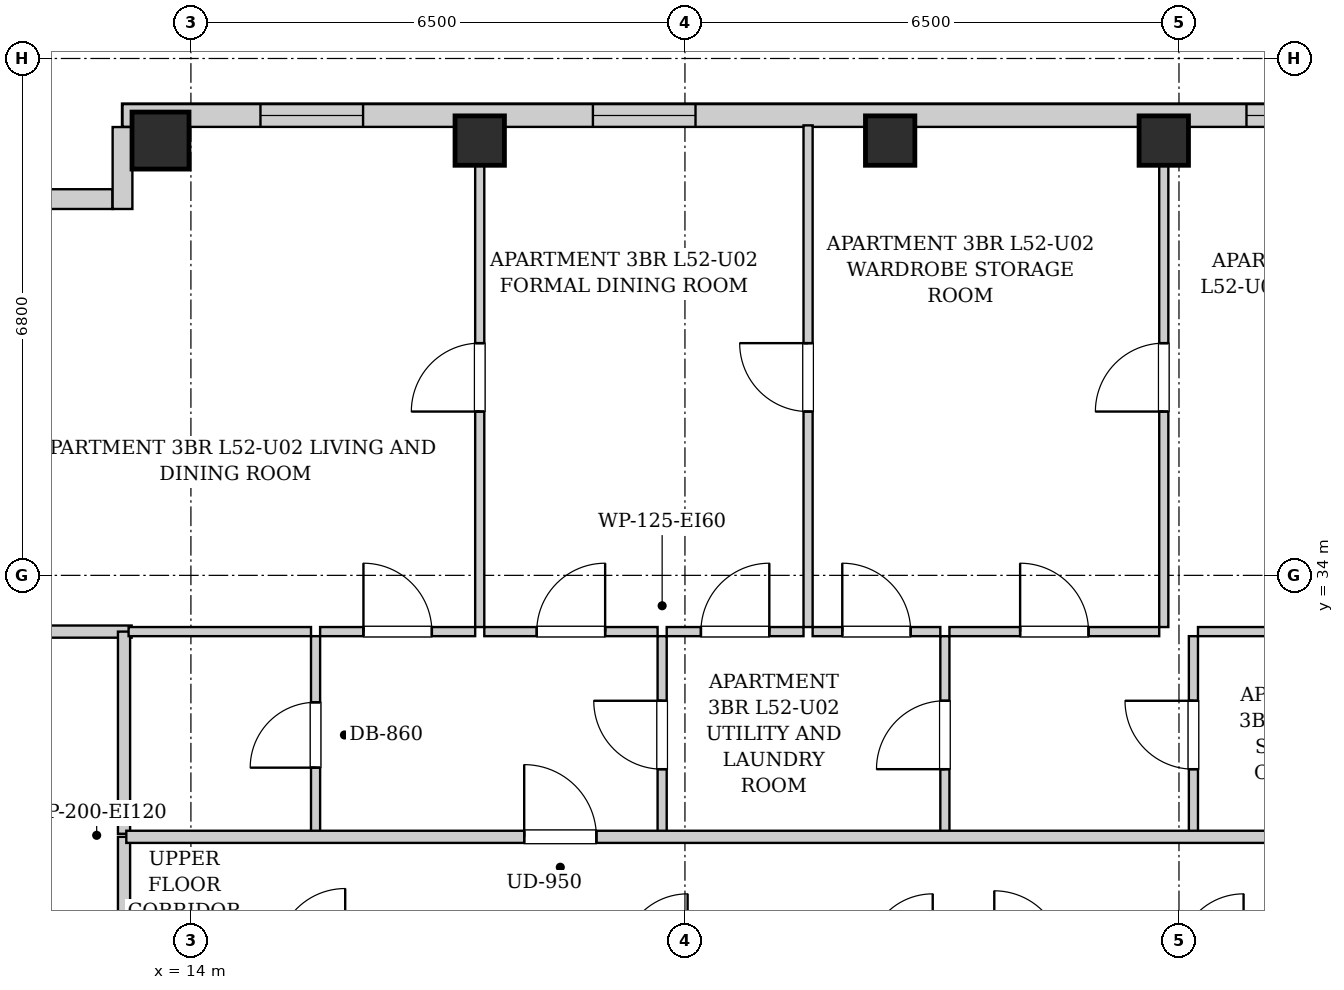
"""IFC4 building model, lengths in metres.
Left out: names, types, materials, properties, quantities, classifications, styles, units other than length and angle.
Written with IfcOpenShell. Run it as: python <this file> out.ifc"""

import sys

from ifc_helpers import new_model, si_unit, direction, frame, frame_2d, origin, origin_2d, place, context, subcontext, project, spatial, rectangle, extrude, element, fill, save


model = new_model("IFC4")
c1 = context("Model", 3, precision=1e-05, world=origin(), true_north=direction((0.0, 1.0)))
c2 = subcontext(c1, "Body", "Model", "MODEL_VIEW")
j1 = project(units=[si_unit("LENGTHUNIT", "METRE"), si_unit("PLANEANGLEUNIT", "RADIAN")], contexts=[c1])
p1 = place(None, origin())
s1 = spatial("IfcSite", under=j1, at=p1, CompositionType="ELEMENT")
p2 = place(p1, origin())
s2 = spatial("IfcBuilding", under=s1, at=p2, CompositionType="ELEMENT")
p3 = place(p2, frame((0.0, 0.0, 181.0)))
s3 = spatial("IfcBuildingStorey", under=s2, at=p3, CompositionType="ELEMENT", Elevation=181.0)
p4 = place(p3, frame((13.6, 39.72, 0.0), z_axis=(0.0, 0.0, 1.0), x_axis=(1.0, 0.0, 0.0)))
e1 = element("IfcColumn", 1, at=p4, inside=s3, PredefinedType="COLUMN", context=c2, shape_type="SweptSolid", body=[
    extrude(rectangle(XDim=0.75, YDim=0.75, at=origin_2d()), origin(), (0.0, 0.0, 1.0), 3.3),
])
for number, where, z_axis, x_axis in (
    (2, (17.8, 39.72, 0.0), (0.0, 0.0, 1.0), (1.0, 0.0, 0.0)),
    (3, (23.2, 39.72, 0.0), (0.0, 0.0, 1.0), (1.0, 0.0, 0.0)),
    (4, (26.8, 39.72, 0.0), (0.0, 0.0, 1.0), (1.0, 0.0, 0.0)),
):
    element("IfcColumn", number, at=place(p3, frame(where, z_axis=z_axis, x_axis=x_axis)), inside=s3, PredefinedType="COLUMN", context=c2, shape_type="SweptSolid", body=[
        extrude(rectangle(XDim=0.65, YDim=0.65, at=origin_2d()), origin(), (0.0, 0.0, 1.0), 3.3),
    ])
p5 = place(p3, frame((13.1, 40.05, 0.0), z_axis=(0.0, 0.0, 1.0), x_axis=(1.0, 0.0, 0.0)))
e5 = element("IfcWall", 5, at=p5, inside=s3, PredefinedType="SOLIDWALL", context=c2, shape_type="SweptSolid", body=[
    extrude(rectangle(XDim=17.5, YDim=0.3, at=frame_2d((8.75, 0.0))), origin(), (0.0, 0.0, 1.0), 3.04),
])
p6 = place(p5, frame((1.815, 0.0, 0.55)))
e6 = element("IfcOpeningElement", 6, at=p6, cuts=e5, PredefinedType="OPENING", context=c2, shape_type="SweptSolid", body=[
    extrude(rectangle(XDim=1.35, YDim=1.2, at=frame_2d((0.675, 0.6))), frame((0.0, 0.16, 0.0), z_axis=(0.0, -1.0, 0.0), x_axis=(1.0, 0.0, 0.0)), (0.0, 0.0, 1.0), 0.32),
])
p7 = place(p5, frame((6.189, 0.0, 0.55)))
e7 = element("IfcOpeningElement", 7, at=p7, cuts=e5, PredefinedType="OPENING", context=c2, shape_type="SweptSolid", body=[
    extrude(rectangle(XDim=1.35, YDim=1.2, at=frame_2d((0.675, 0.6))), frame((0.0, 0.16, 0.0), z_axis=(0.0, -1.0, 0.0), x_axis=(1.0, 0.0, 0.0)), (0.0, 0.0, 1.0), 0.32),
])
p8 = place(p5, frame((14.788, 0.0, 0.55)))
e8 = element("IfcOpeningElement", 8, at=p8, cuts=e5, PredefinedType="OPENING", context=c2, shape_type="SweptSolid", body=[
    extrude(rectangle(XDim=1.35, YDim=1.2, at=frame_2d((0.675, 0.6))), frame((0.0, 0.16, 0.0), z_axis=(0.0, -1.0, 0.0), x_axis=(1.0, 0.0, 0.0)), (0.0, 0.0, 1.0), 0.32),
])
p9 = place(p3, frame((11.982, 38.95, 0.0), z_axis=(0.0, 0.0, 1.0), x_axis=(1.0, 0.0, 0.0)))
e9 = element("IfcWall", 9, at=p9, inside=s3, PredefinedType="SOLIDWALL", context=c2, shape_type="SweptSolid", body=[
    extrude(rectangle(XDim=0.986, YDim=0.26, at=frame_2d((0.493, 0.0))), origin(), (0.0, 0.0, 1.0), 3.04),
])
p10 = place(p3, frame((13.1, 38.82, 0.0), z_axis=(0.0, 0.0, 1.0), x_axis=(0.0, 1.0, 0.0)))
e10 = element("IfcWall", 10, at=p10, inside=s3, PredefinedType="SOLIDWALL", context=c2, shape_type="SweptSolid", body=[
    extrude(rectangle(XDim=1.078, YDim=0.26, at=frame_2d((0.539, 0.0))), origin(), (0.0, 0.0, 1.0), 3.04),
])
p11 = place(p3, frame((13.12, 28.98, 0.0), z_axis=(0.0, 0.0, 1.0), x_axis=(0.0, 1.0, 0.0)))
e11 = element("IfcWall", 11, at=p11, inside=s3, PredefinedType="PARTITIONING", context=c2, shape_type="SweptSolid", body=[
    extrude(rectangle(XDim=1.58, YDim=0.16, at=frame_2d((0.79, 0.0))), origin(), (0.0, 0.0, 1.0), 3.04),
])
p12 = place(p3, frame((10.88, 33.26, 0.0), z_axis=(0.0, 0.0, 1.0), x_axis=(1.0, 0.0, 0.0)))
e12 = element("IfcWall", 12, at=p12, inside=s3, PredefinedType="PARTITIONING", context=c2, shape_type="SweptSolid", body=[
    extrude(rectangle(XDim=2.34, YDim=0.16, at=frame_2d((1.17, 0.0))), origin(), (0.0, 0.0, 1.0), 3.04),
])
p13 = place(p3, frame((13.12, 30.6, 0.0), z_axis=(0.0, 0.0, 1.0), x_axis=(0.0, 1.0, 0.0)))
e13 = element("IfcWall", 13, at=p13, inside=s3, PredefinedType="PARTITIONING", context=c2, shape_type="SweptSolid", body=[
    extrude(rectangle(XDim=2.66, YDim=0.16, at=frame_2d((1.33, 0.0))), origin(), (0.0, 0.0, 1.0), 3.04),
])
p14 = place(p3, frame((15.64, 30.6, 0.0), z_axis=(0.0, 0.0, 1.0), x_axis=(0.0, 1.0, 0.0)))
e14 = element("IfcWall", 14, at=p14, inside=s3, PredefinedType="PARTITIONING", context=c2, shape_type="SweptSolid", body=[
    extrude(rectangle(XDim=2.6, YDim=0.12, at=frame_2d((1.3, 0.0))), origin(), (0.0, 0.0, 1.0), 3.04),
])
p15 = place(p14, frame((0.87, 0.0, 0.0)))
e15 = element("IfcOpeningElement", 15, at=p15, cuts=e14, PredefinedType="OPENING", context=c2, shape_type="SweptSolid", body=[
    extrude(rectangle(XDim=0.86, YDim=2.05, at=frame_2d((0.43, 1.025))), frame((0.0, 0.07, 0.0), z_axis=(0.0, -1.0, 0.0), x_axis=(1.0, 0.0, 0.0)), (0.0, 0.0, 1.0), 0.14),
])
p16 = place(p3, frame((13.18, 33.26, 0.0), z_axis=(0.0, 0.0, 1.0), x_axis=(1.0, 0.0, 0.0)))
e16 = element("IfcWall", 16, at=p16, inside=s3, PredefinedType="PARTITIONING", context=c2, shape_type="SweptSolid", body=[
    extrude(rectangle(XDim=2.4, YDim=0.12, at=frame_2d((1.2, 0.0))), origin(), (0.0, 0.0, 1.0), 3.04),
])
p17 = place(p3, frame((20.2, 30.6, 0.0), z_axis=(0.0, 0.0, 1.0), x_axis=(0.0, 1.0, 0.0)))
e17 = element("IfcWall", 17, at=p17, inside=s3, PredefinedType="PARTITIONING", context=c2, shape_type="SweptSolid", body=[
    extrude(rectangle(XDim=2.6, YDim=0.12, at=frame_2d((1.3, 0.0))), origin(), (0.0, 0.0, 1.0), 3.04),
])
p18 = place(p17, frame((0.85, 0.0, 0.0)))
e18 = element("IfcOpeningElement", 18, at=p18, cuts=e17, PredefinedType="OPENING", context=c2, shape_type="SweptSolid", body=[
    extrude(rectangle(XDim=0.9, YDim=2.05, at=frame_2d((0.45, 1.025))), frame((0.0, 0.07, 0.0), z_axis=(0.0, -1.0, 0.0), x_axis=(1.0, 0.0, 0.0)), (0.0, 0.0, 1.0), 0.14),
])
p19 = place(p3, frame((15.7, 33.26, 0.0), z_axis=(0.0, 0.0, 1.0), x_axis=(1.0, 0.0, 0.0)))
e19 = element("IfcWall", 19, at=p19, inside=s3, PredefinedType="PARTITIONING", context=c2, shape_type="SweptSolid", body=[
    extrude(rectangle(XDim=2.04, YDim=0.12, at=frame_2d((1.02, 0.0))), origin(), (0.0, 0.0, 1.0), 3.04),
])
p20 = place(p19, frame((0.57, 0.0, 0.0)))
e20 = element("IfcOpeningElement", 20, at=p20, cuts=e19, PredefinedType="OPENING", context=c2, shape_type="SweptSolid", body=[
    extrude(rectangle(XDim=0.9, YDim=2.05, at=frame_2d((0.45, 1.025))), frame((0.0, 0.07, 0.0), z_axis=(0.0, -1.0, 0.0), x_axis=(1.0, 0.0, 0.0)), (0.0, 0.0, 1.0), 0.14),
])
p21 = place(p3, frame((17.86, 33.26, 0.0), z_axis=(0.0, 0.0, 1.0), x_axis=(1.0, 0.0, 0.0)))
e21 = element("IfcWall", 21, at=p21, inside=s3, PredefinedType="PARTITIONING", context=c2, shape_type="SweptSolid", body=[
    extrude(rectangle(XDim=2.28, YDim=0.12, at=frame_2d((1.14, 0.0))), origin(), (0.0, 0.0, 1.0), 3.04),
])
p22 = place(p21, frame((0.69, 0.0, 0.0)))
e22 = element("IfcOpeningElement", 22, at=p22, cuts=e21, PredefinedType="OPENING", context=c2, shape_type="SweptSolid", body=[
    extrude(rectangle(XDim=0.9, YDim=2.05, at=frame_2d((0.45, 1.025))), frame((0.0, 0.07, 0.0), z_axis=(0.0, -1.0, 0.0), x_axis=(1.0, 0.0, 0.0)), (0.0, 0.0, 1.0), 0.14),
])
p23 = place(p3, frame((23.92, 30.6, 0.0), z_axis=(0.0, 0.0, 1.0), x_axis=(0.0, 1.0, 0.0)))
e23 = element("IfcWall", 23, at=p23, inside=s3, PredefinedType="PARTITIONING", context=c2, shape_type="SweptSolid", body=[
    extrude(rectangle(XDim=2.6, YDim=0.12, at=frame_2d((1.3, 0.0))), origin(), (0.0, 0.0, 1.0), 3.04),
])
p24 = place(p23, frame((0.85, 0.0, 0.0)))
e24 = element("IfcOpeningElement", 24, at=p24, cuts=e23, PredefinedType="OPENING", context=c2, shape_type="SweptSolid", body=[
    extrude(rectangle(XDim=0.9, YDim=2.05, at=frame_2d((0.45, 1.025))), frame((0.0, 0.07, 0.0), z_axis=(0.0, -1.0, 0.0), x_axis=(1.0, 0.0, 0.0)), (0.0, 0.0, 1.0), 0.14),
])
p25 = place(p3, frame((20.26, 33.26, 0.0), z_axis=(0.0, 0.0, 1.0), x_axis=(1.0, 0.0, 0.0)))
e25 = element("IfcWall", 25, at=p25, inside=s3, PredefinedType="PARTITIONING", context=c2, shape_type="SweptSolid", body=[
    extrude(rectangle(XDim=1.8, YDim=0.12, at=frame_2d((0.9, 0.0))), origin(), (0.0, 0.0, 1.0), 3.04),
])
p26 = place(p25, frame((0.45, 0.0, 0.0)))
e26 = element("IfcOpeningElement", 26, at=p26, cuts=e25, PredefinedType="OPENING", context=c2, shape_type="SweptSolid", body=[
    extrude(rectangle(XDim=0.9, YDim=2.05, at=frame_2d((0.45, 1.025))), frame((0.0, 0.07, 0.0), z_axis=(0.0, -1.0, 0.0), x_axis=(1.0, 0.0, 0.0)), (0.0, 0.0, 1.0), 0.14),
])
p27 = place(p3, frame((22.18, 33.26, 0.0), z_axis=(0.0, 0.0, 1.0), x_axis=(1.0, 0.0, 0.0)))
e27 = element("IfcWall", 27, at=p27, inside=s3, PredefinedType="PARTITIONING", context=c2, shape_type="SweptSolid", body=[
    extrude(rectangle(XDim=1.68, YDim=0.12, at=frame_2d((0.84, 0.0))), origin(), (0.0, 0.0, 1.0), 3.04),
])
p28 = place(p27, frame((0.39, 0.0, 0.0)))
e28 = element("IfcOpeningElement", 28, at=p28, cuts=e27, PredefinedType="OPENING", context=c2, shape_type="SweptSolid", body=[
    extrude(rectangle(XDim=0.9, YDim=2.05, at=frame_2d((0.45, 1.025))), frame((0.0, 0.07, 0.0), z_axis=(0.0, -1.0, 0.0), x_axis=(1.0, 0.0, 0.0)), (0.0, 0.0, 1.0), 0.14),
])
p29 = place(p3, frame((27.19, 30.6, 0.0), z_axis=(0.0, 0.0, 1.0), x_axis=(0.0, 1.0, 0.0)))
e29 = element("IfcWall", 29, at=p29, inside=s3, PredefinedType="PARTITIONING", context=c2, shape_type="SweptSolid", body=[
    extrude(rectangle(XDim=2.6, YDim=0.12, at=frame_2d((1.3, 0.0))), origin(), (0.0, 0.0, 1.0), 3.04),
])
p30 = place(p29, frame((0.85, 0.0, 0.0)))
e30 = element("IfcOpeningElement", 30, at=p30, cuts=e29, PredefinedType="OPENING", context=c2, shape_type="SweptSolid", body=[
    extrude(rectangle(XDim=0.9, YDim=2.05, at=frame_2d((0.45, 1.025))), frame((0.0, 0.07, 0.0), z_axis=(0.0, -1.0, 0.0), x_axis=(1.0, 0.0, 0.0)), (0.0, 0.0, 1.0), 0.14),
])
p31 = place(p3, frame((23.98, 33.26, 0.0), z_axis=(0.0, 0.0, 1.0), x_axis=(1.0, 0.0, 0.0)))
e31 = element("IfcWall", 31, at=p31, inside=s3, PredefinedType="PARTITIONING", context=c2, shape_type="SweptSolid", body=[
    extrude(rectangle(XDim=2.76, YDim=0.12, at=frame_2d((1.38, 0.0))), origin(), (0.0, 0.0, 1.0), 3.04),
])
p32 = place(p31, frame((0.93, 0.0, 0.0)))
e32 = element("IfcOpeningElement", 32, at=p32, cuts=e31, PredefinedType="OPENING", context=c2, shape_type="SweptSolid", body=[
    extrude(rectangle(XDim=0.9, YDim=2.05, at=frame_2d((0.45, 1.025))), frame((0.0, 0.07, 0.0), z_axis=(0.0, -1.0, 0.0), x_axis=(1.0, 0.0, 0.0)), (0.0, 0.0, 1.0), 0.14),
])
p33 = place(p3, frame((27.25, 33.26, 0.0), z_axis=(0.0, 0.0, 1.0), x_axis=(1.0, 0.0, 0.0)))
e33 = element("IfcWall", 33, at=p33, inside=s3, PredefinedType="PARTITIONING", context=c2, shape_type="SweptSolid", body=[
    extrude(rectangle(XDim=3.09, YDim=0.12, at=frame_2d((1.545, 0.0))), origin(), (0.0, 0.0, 1.0), 3.04),
])
p34 = place(p33, frame((1.095, 0.0, 0.0)))
e34 = element("IfcOpeningElement", 34, at=p34, cuts=e33, PredefinedType="OPENING", context=c2, shape_type="SweptSolid", body=[
    extrude(rectangle(XDim=0.9, YDim=2.05, at=frame_2d((0.45, 1.025))), frame((0.0, 0.07, 0.0), z_axis=(0.0, -1.0, 0.0), x_axis=(1.0, 0.0, 0.0)), (0.0, 0.0, 1.0), 0.14),
])
p35 = place(p3, frame((17.8, 33.32, 0.0), z_axis=(0.0, 0.0, 1.0), x_axis=(0.0, 1.0, 0.0)))
e35 = element("IfcWall", 35, at=p35, inside=s3, PredefinedType="PARTITIONING", context=c2, shape_type="SweptSolid", body=[
    extrude(rectangle(XDim=6.6, YDim=0.12, at=frame_2d((3.3, 0.0))), origin(), (0.0, 0.0, 1.0), 2.556),
])
p36 = place(p35, frame((2.835, 0.0, 0.0)))
e36 = element("IfcOpeningElement", 36, at=p36, cuts=e35, PredefinedType="OPENING", context=c2, shape_type="SweptSolid", body=[
    extrude(rectangle(XDim=0.9, YDim=2.05, at=frame_2d((0.45, 1.025))), frame((0.0, 0.07, 0.0), z_axis=(0.0, -1.0, 0.0), x_axis=(1.0, 0.0, 0.0)), (0.0, 0.0, 1.0), 0.14),
])
p37 = place(p3, frame((22.12, 33.32, 0.0), z_axis=(0.0, 0.0, 1.0), x_axis=(0.0, 1.0, 0.0)))
e37 = element("IfcWall", 37, at=p37, inside=s3, PredefinedType="PARTITIONING", context=c2, shape_type="SweptSolid", body=[
    extrude(rectangle(XDim=6.6, YDim=0.12, at=frame_2d((3.3, 0.0))), origin(), (0.0, 0.0, 1.0), 3.04),
])
p38 = place(p37, frame((2.835, 0.0, 0.0)))
e38 = element("IfcOpeningElement", 38, at=p38, cuts=e37, PredefinedType="OPENING", context=c2, shape_type="SweptSolid", body=[
    extrude(rectangle(XDim=0.9, YDim=2.05, at=frame_2d((0.45, 1.025))), frame((0.0, 0.07, 0.0), z_axis=(0.0, -1.0, 0.0), x_axis=(1.0, 0.0, 0.0)), (0.0, 0.0, 1.0), 0.14),
])
p39 = place(p3, frame((26.8, 33.32, 0.0), z_axis=(0.0, 0.0, 1.0), x_axis=(0.0, 1.0, 0.0)))
e39 = element("IfcWall", 39, at=p39, inside=s3, PredefinedType="PARTITIONING", context=c2, shape_type="SweptSolid", body=[
    extrude(rectangle(XDim=6.6, YDim=0.12, at=frame_2d((3.3, 0.0))), origin(), (0.0, 0.0, 1.0), 3.04),
])
p40 = place(p39, frame((2.835, 0.0, 0.0)))
e40 = element("IfcOpeningElement", 40, at=p40, cuts=e39, PredefinedType="OPENING", context=c2, shape_type="SweptSolid", body=[
    extrude(rectangle(XDim=0.9, YDim=2.05, at=frame_2d((0.45, 1.025))), frame((0.0, 0.07, 0.0), z_axis=(0.0, -1.0, 0.0), x_axis=(1.0, 0.0, 0.0)), (0.0, 0.0, 1.0), 0.14),
])
p41 = place(p3, frame((13.15, 30.56, 0.0), z_axis=(0.0, 0.0, 1.0), x_axis=(1.0, 0.0, 0.0)))
e41 = element("IfcWall", 41, at=p41, inside=s3, PredefinedType="PARTITIONING", context=c2, shape_type="SweptSolid", body=[
    extrude(rectangle(XDim=24.6, YDim=0.16, at=frame_2d((12.3, 0.0))), origin(), (0.0, 0.0, 1.0), 3.04),
])
p42 = place(p41, frame((5.235, 0.0, 0.0)))
e42 = element("IfcOpeningElement", 42, at=p42, cuts=e41, PredefinedType="OPENING", context=c2, shape_type="SweptSolid", body=[
    extrude(rectangle(XDim=0.95, YDim=2.1, at=frame_2d((0.475, 1.05))), frame((0.0, 0.09, 0.0), z_axis=(0.0, -1.0, 0.0), x_axis=(1.0, 0.0, 0.0)), (0.0, 0.0, 1.0), 0.18),
])
p43 = place(p15, origin())
e43 = element("IfcDoor", 43, at=p43, inside=s3, OperationType="SINGLE_SWING_LEFT", PredefinedType="DOOR", context=c2, shape_type="SweptSolid", body=[
    extrude(rectangle(XDim=0.86, YDim=2.05, at=frame_2d((0.43, 1.025))), frame((0.0, 0.025, 0.0), z_axis=(0.0, -1.0, 0.0), x_axis=(1.0, 0.0, 0.0)), (0.0, 0.0, 1.0), 0.05),
])
fill(e15, e43)
p44 = place(p18, origin())
e44 = element("IfcDoor", 44, at=p44, inside=s3, OperationType="SINGLE_SWING_RIGHT", PredefinedType="DOOR", context=c2, shape_type="SweptSolid", body=[
    extrude(rectangle(XDim=0.9, YDim=2.05, at=frame_2d((0.45, 1.025))), frame((0.0, 0.025, 0.0), z_axis=(0.0, -1.0, 0.0), x_axis=(1.0, 0.0, 0.0)), (0.0, 0.0, 1.0), 0.05),
])
fill(e18, e44)
p45 = place(p20, origin())
e45 = element("IfcDoor", 45, at=p45, inside=s3, OperationType="SINGLE_SWING_LEFT", PredefinedType="DOOR", context=c2, shape_type="SweptSolid", body=[
    extrude(rectangle(XDim=0.9, YDim=2.05, at=frame_2d((0.45, 1.025))), frame((0.0, 0.025, 0.0), z_axis=(0.0, -1.0, 0.0), x_axis=(1.0, 0.0, 0.0)), (0.0, 0.0, 1.0), 0.05),
])
fill(e20, e45)
p46 = place(p22, origin())
e46 = element("IfcDoor", 46, at=p46, inside=s3, OperationType="SINGLE_SWING_RIGHT", PredefinedType="DOOR", context=c2, shape_type="SweptSolid", body=[
    extrude(rectangle(XDim=0.9, YDim=2.05, at=frame_2d((0.45, 1.025))), frame((0.0, 0.025, 0.0), z_axis=(0.0, -1.0, 0.0), x_axis=(1.0, 0.0, 0.0)), (0.0, 0.0, 1.0), 0.05),
])
fill(e22, e46)
p47 = place(p24, origin())
e47 = element("IfcDoor", 47, at=p47, inside=s3, OperationType="SINGLE_SWING_LEFT", PredefinedType="DOOR", context=c2, shape_type="SweptSolid", body=[
    extrude(rectangle(XDim=0.9, YDim=2.05, at=frame_2d((0.45, 1.025))), frame((0.0, 0.025, 0.0), z_axis=(0.0, -1.0, 0.0), x_axis=(1.0, 0.0, 0.0)), (0.0, 0.0, 1.0), 0.05),
])
fill(e24, e47)
p48 = place(p26, origin())
e48 = element("IfcDoor", 48, at=p48, inside=s3, OperationType="SINGLE_SWING_RIGHT", PredefinedType="DOOR", context=c2, shape_type="SweptSolid", body=[
    extrude(rectangle(XDim=0.9, YDim=2.05, at=frame_2d((0.45, 1.025))), frame((0.0, 0.025, 0.0), z_axis=(0.0, -1.0, 0.0), x_axis=(1.0, 0.0, 0.0)), (0.0, 0.0, 1.0), 0.05),
])
fill(e26, e48)
p49 = place(p28, origin())
e49 = element("IfcDoor", 49, at=p49, inside=s3, OperationType="SINGLE_SWING_LEFT", PredefinedType="DOOR", context=c2, shape_type="SweptSolid", body=[
    extrude(rectangle(XDim=0.9, YDim=2.05, at=frame_2d((0.45, 1.025))), frame((0.0, 0.025, 0.0), z_axis=(0.0, -1.0, 0.0), x_axis=(1.0, 0.0, 0.0)), (0.0, 0.0, 1.0), 0.05),
])
fill(e28, e49)
p50 = place(p30, origin())
e50 = element("IfcDoor", 50, at=p50, inside=s3, OperationType="SINGLE_SWING_RIGHT", PredefinedType="DOOR", context=c2, shape_type="SweptSolid", body=[
    extrude(rectangle(XDim=0.9, YDim=2.05, at=frame_2d((0.45, 1.025))), frame((0.0, 0.025, 0.0), z_axis=(0.0, -1.0, 0.0), x_axis=(1.0, 0.0, 0.0)), (0.0, 0.0, 1.0), 0.05),
])
fill(e30, e50)
p51 = place(p32, origin())
e51 = element("IfcDoor", 51, at=p51, inside=s3, OperationType="SINGLE_SWING_LEFT", PredefinedType="DOOR", context=c2, shape_type="SweptSolid", body=[
    extrude(rectangle(XDim=0.9, YDim=2.05, at=frame_2d((0.45, 1.025))), frame((0.0, 0.025, 0.0), z_axis=(0.0, -1.0, 0.0), x_axis=(1.0, 0.0, 0.0)), (0.0, 0.0, 1.0), 0.05),
])
fill(e32, e51)
p52 = place(p36, origin())
e52 = element("IfcDoor", 52, at=p52, inside=s3, OperationType="SINGLE_SWING_LEFT", PredefinedType="DOOR", context=c2, shape_type="SweptSolid", body=[
    extrude(rectangle(XDim=0.9, YDim=2.05, at=frame_2d((0.45, 1.025))), frame((0.0, 0.025, 0.0), z_axis=(0.0, -1.0, 0.0), x_axis=(1.0, 0.0, 0.0)), (0.0, 0.0, 1.0), 0.05),
])
fill(e36, e52)
p53 = place(p38, origin())
e53 = element("IfcDoor", 53, at=p53, inside=s3, OperationType="SINGLE_SWING_RIGHT", PredefinedType="DOOR", context=c2, shape_type="SweptSolid", body=[
    extrude(rectangle(XDim=0.9, YDim=2.05, at=frame_2d((0.45, 1.025))), frame((0.0, 0.025, 0.0), z_axis=(0.0, -1.0, 0.0), x_axis=(1.0, 0.0, 0.0)), (0.0, 0.0, 1.0), 0.05),
])
fill(e38, e53)
p54 = place(p40, origin())
e54 = element("IfcDoor", 54, at=p54, inside=s3, OperationType="SINGLE_SWING_LEFT", PredefinedType="DOOR", context=c2, shape_type="SweptSolid", body=[
    extrude(rectangle(XDim=0.9, YDim=2.05, at=frame_2d((0.45, 1.025))), frame((0.0, 0.025, 0.0), z_axis=(0.0, -1.0, 0.0), x_axis=(1.0, 0.0, 0.0)), (0.0, 0.0, 1.0), 0.05),
])
fill(e40, e54)
p55 = place(p42, origin())
e55 = element("IfcDoor", 55, at=p55, inside=s3, OperationType="SINGLE_SWING_LEFT", PredefinedType="DOOR", context=c2, shape_type="SweptSolid", body=[
    extrude(rectangle(XDim=0.95, YDim=2.1, at=frame_2d((0.475, 1.05))), frame((0.0, 0.025, 0.0), z_axis=(0.0, -1.0, 0.0), x_axis=(1.0, 0.0, 0.0)), (0.0, 0.0, 1.0), 0.05),
])
fill(e42, e55)
p56 = place(p6, origin())
e56 = element("IfcWindow", 56, at=p56, inside=s3, PartitioningType="SINGLE_PANEL", PredefinedType="WINDOW", context=c2, shape_type="SweptSolid", body=[
    extrude(rectangle(XDim=1.35, YDim=1.2, at=frame_2d((0.675, 0.6))), frame((0.0, 0.03, 0.0), z_axis=(0.0, -1.0, 0.0), x_axis=(1.0, 0.0, 0.0)), (0.0, 0.0, 1.0), 0.06),
])
fill(e6, e56)
p57 = place(p7, origin())
e57 = element("IfcWindow", 57, at=p57, inside=s3, PartitioningType="SINGLE_PANEL", PredefinedType="WINDOW", context=c2, shape_type="SweptSolid", body=[
    extrude(rectangle(XDim=1.35, YDim=1.2, at=frame_2d((0.675, 0.6))), frame((0.0, 0.03, 0.0), z_axis=(0.0, -1.0, 0.0), x_axis=(1.0, 0.0, 0.0)), (0.0, 0.0, 1.0), 0.06),
])
fill(e7, e57)
p58 = place(p8, origin())
e58 = element("IfcWindow", 58, at=p58, inside=s3, PartitioningType="SINGLE_PANEL", PredefinedType="WINDOW", context=c2, shape_type="SweptSolid", body=[
    extrude(rectangle(XDim=1.35, YDim=1.2, at=frame_2d((0.675, 0.6))), frame((0.0, 0.03, 0.0), z_axis=(0.0, -1.0, 0.0), x_axis=(1.0, 0.0, 0.0)), (0.0, 0.0, 1.0), 0.06),
])
fill(e8, e58)
save(model, sys.argv[1])
